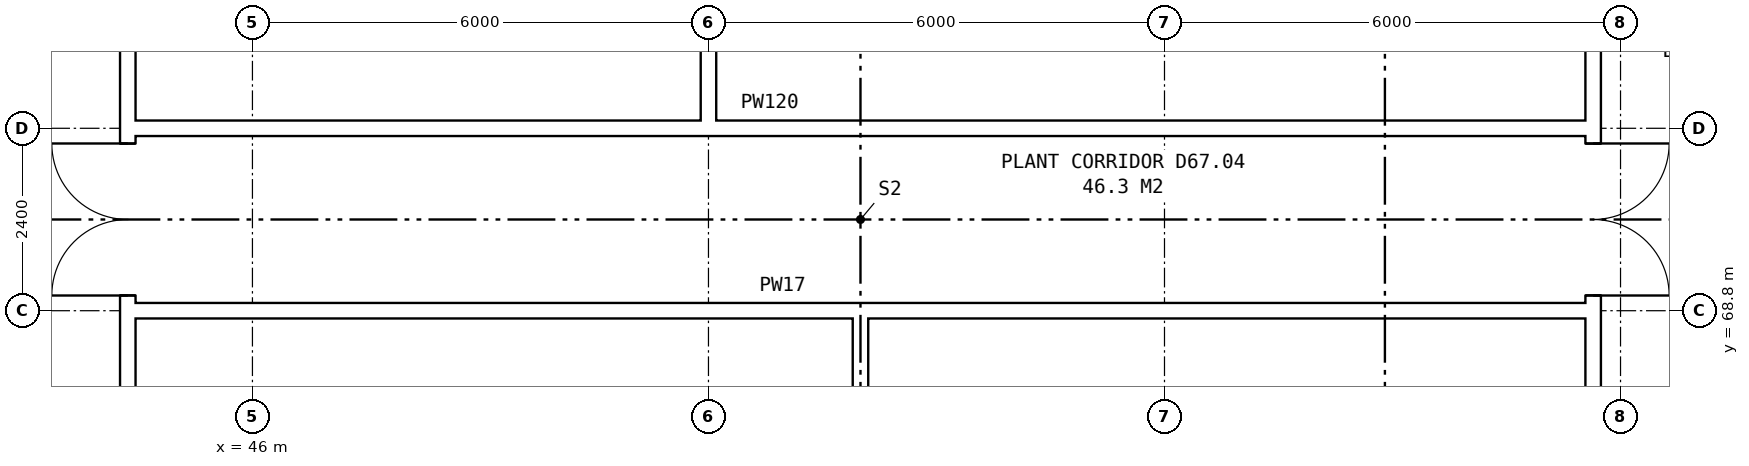
"""IFC4 building model, lengths in metres.
Left out: names, types, materials, properties, quantities, classifications, styles, units other than length and angle.
Written with IfcOpenShell. Run it as: python <this file> out.ifc"""

import sys

from ifc_helpers import new_model, si_unit, direction, frame, frame_2d, origin, place, context, subcontext, project, spatial, rectangle, extrude, element, fill, save


model = new_model("IFC4")
c1 = context("Model", 3, precision=1e-05, world=origin(), true_north=direction((0.0, 1.0)))
c2 = subcontext(c1, "Body", "Model", "MODEL_VIEW")
j1 = project(units=[si_unit("LENGTHUNIT", "METRE"), si_unit("PLANEANGLEUNIT", "RADIAN")], contexts=[c1])
p1 = place(None, origin())
s1 = spatial("IfcSite", under=j1, at=p1, CompositionType="ELEMENT")
p2 = place(p1, origin())
s2 = spatial("IfcBuilding", under=s1, at=p2, CompositionType="ELEMENT")
p3 = place(p2, frame((0.0, 0.0, 236.9)))
s3 = spatial("IfcBuildingStorey", under=s2, at=p3, CompositionType="ELEMENT", Elevation=236.9)
p4 = place(p3, frame((63.64, 63.9, 0.0), z_axis=(0.0, 0.0, 1.0), x_axis=(0.0, 1.0, 0.0)))
e1 = element("IfcWall", 1, at=p4, inside=s3, PredefinedType="PARTITIONING", context=c2, shape_type="SweptSolid", body=[
    extrude(rectangle(XDim=12.2, YDim=0.2, at=frame_2d((6.1, 0.0))), origin(), (0.0, 0.0, 1.0), 6.7),
])
p5 = place(p4, frame((5.1, 0.0, 0.0)))
e2 = element("IfcOpeningElement", 2, at=p5, cuts=e1, PredefinedType="OPENING", context=c2, shape_type="SweptSolid", body=[
    extrude(rectangle(XDim=2.0, YDim=2.1, at=frame_2d((1.0, 1.05))), frame((0.0, 0.11, 0.0), z_axis=(0.0, -1.0, 0.0), x_axis=(1.0, 0.0, 0.0)), (0.0, 0.0, 1.0), 0.22),
])
p6 = place(p3, frame((44.36, 63.9, 0.0), z_axis=(0.0, 0.0, 1.0), x_axis=(0.0, 1.0, 0.0)))
e3 = element("IfcWall", 3, at=p6, inside=s3, PredefinedType="PARTITIONING", context=c2, shape_type="SweptSolid", body=[
    extrude(rectangle(XDim=12.2, YDim=0.2, at=frame_2d((6.1, 0.0))), origin(), (0.0, 0.0, 1.0), 6.7),
])
p7 = place(p6, frame((5.1, 0.0, 0.0)))
e4 = element("IfcOpeningElement", 4, at=p7, cuts=e3, PredefinedType="OPENING", context=c2, shape_type="SweptSolid", body=[
    extrude(rectangle(XDim=2.0, YDim=2.1, at=frame_2d((1.0, 1.05))), frame((0.0, 0.11, 0.0), z_axis=(0.0, -1.0, 0.0), x_axis=(1.0, 0.0, 0.0)), (0.0, 0.0, 1.0), 0.22),
])
for number, where, z_axis, x_axis in (
    (5, (44.36, 68.8, 0.0), (0.0, 0.0, 1.0), (1.0, 0.0, 0.0)),
    (6, (44.36, 71.2, 0.0), (0.0, 0.0, 1.0), (1.0, 0.0, 0.0)),
):
    element("IfcWall", number, at=place(p3, frame(where, z_axis=z_axis, x_axis=x_axis)), inside=s3, PredefinedType="PARTITIONING", context=c2, shape_type="SweptSolid", body=[
        extrude(rectangle(XDim=19.28, YDim=0.2, at=frame_2d((9.64, 0.0))), origin(), (0.0, 0.0, 1.0), 6.7),
    ])
for number, where, z_axis, x_axis in (
    (7, (52.0, 71.1, 0.0), (0.0, 0.0, 1.0), (0.0, 1.0, 0.0)),
    (8, (54.0, 63.7, 0.0), (0.0, 0.0, 1.0), (0.0, 1.0, 0.0)),
):
    element("IfcWall", number, at=place(p3, frame(where, z_axis=z_axis, x_axis=x_axis)), inside=s3, PredefinedType="PARTITIONING", context=c2, shape_type="SweptSolid", body=[
        extrude(rectangle(XDim=5.2, YDim=0.2, at=frame_2d((2.6, 0.0))), origin(), (0.0, 0.0, 1.0), 6.7),
    ])
p8 = place(p5, frame((2.0, 0.0, 0.0), z_axis=(0.0, 0.0, 1.0), x_axis=(-1.0, 0.0, 0.0)))
e9 = element("IfcDoor", 9, at=p8, inside=s3, OperationType="DOUBLE_DOOR_SINGLE_SWING", PredefinedType="DOOR", context=c2, shape_type="SweptSolid", body=[
    extrude(rectangle(XDim=2.0, YDim=2.1, at=frame_2d((1.0, 1.05))), frame((0.0, 0.025, 0.0), z_axis=(0.0, -1.0, 0.0), x_axis=(1.0, 0.0, 0.0)), (0.0, 0.0, 1.0), 0.05),
])
fill(e2, e9)
p9 = place(p7, origin())
e10 = element("IfcDoor", 10, at=p9, inside=s3, OperationType="DOUBLE_DOOR_SINGLE_SWING", PredefinedType="DOOR", context=c2, shape_type="SweptSolid", body=[
    extrude(rectangle(XDim=2.0, YDim=2.1, at=frame_2d((1.0, 1.05))), frame((0.0, 0.025, 0.0), z_axis=(0.0, -1.0, 0.0), x_axis=(1.0, 0.0, 0.0)), (0.0, 0.0, 1.0), 0.05),
])
fill(e4, e10)
save(model, sys.argv[1])
